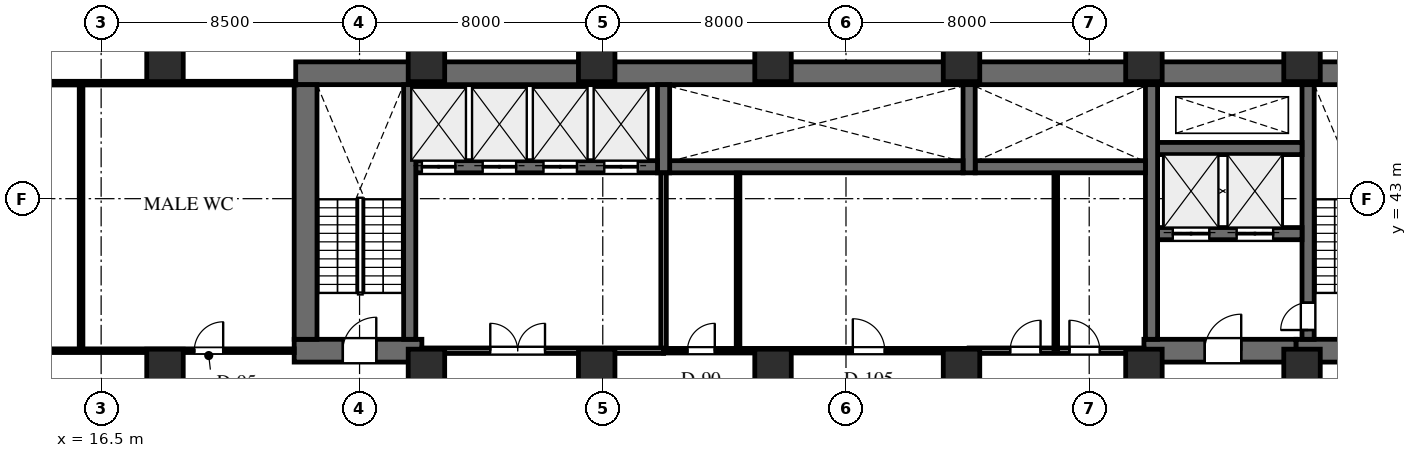
"""IFC4 building model, lengths in metres.
Left out: names, types, materials, properties, quantities, classifications, styles, units other than length and angle.
Written with IfcOpenShell. Run it as: python <this file> out.ifc"""

import sys

from ifc_helpers import new_model, si_unit, direction, frame, frame_2d, origin, origin_2d, place, context, subcontext, project, spatial, rectangle, extrude, element, fill, save


model = new_model("IFC4")
c1 = context("Model", 3, precision=1e-05, world=origin(), true_north=direction((0.0, 1.0)))
c2 = subcontext(c1, "Body", "Model", "MODEL_VIEW")
j1 = project(units=[si_unit("LENGTHUNIT", "METRE"), si_unit("PLANEANGLEUNIT", "RADIAN")], contexts=[c1])
p1 = place(None, origin())
s1 = spatial("IfcSite", under=j1, at=p1, CompositionType="ELEMENT")
p2 = place(p1, origin())
s2 = spatial("IfcBuilding", under=s1, at=p2, CompositionType="ELEMENT")
p3 = place(p2, frame((0.0, 0.0, 69.5)))
s3 = spatial("IfcBuildingStorey", under=s2, at=p3, CompositionType="ELEMENT", Elevation=69.5)
p4 = place(p3, frame((22.9, 47.125, 0.0), z_axis=(0.0, 0.0, 1.0), x_axis=(1.0, 0.0, 0.0)))
e1 = element("IfcWall", 1, at=p4, inside=s3, PredefinedType="SHEAR", context=c2, shape_type="SweptSolid", body=[
    extrude(rectangle(XDim=43.7, YDim=0.75, at=frame_2d((21.85, 0.0))), origin(), (0.0, 0.0, 1.0), 4.0),
])
p5 = place(p3, frame((55.8, 38.0, 0.0), z_axis=(0.0, 0.0, 1.0), x_axis=(1.0, 0.0, 0.0)))
e2 = element("IfcWall", 2, at=p5, inside=s3, PredefinedType="SHEAR", context=c2, shape_type="SweptSolid", body=[
    extrude(rectangle(XDim=10.8, YDim=0.75, at=frame_2d((5.4, 0.0))), origin(), (0.0, 0.0, 1.0), 4.0),
])
p6 = place(p5, frame((1.5, 0.0, 0.0)))
e3 = element("IfcOpeningElement", 3, at=p6, cuts=e2, PredefinedType="OPENING", context=c2, shape_type="SweptSolid", body=[
    extrude(rectangle(XDim=1.1, YDim=2.2, at=frame_2d((0.55, 1.1))), frame((0.0, 0.385, 0.0), z_axis=(0.0, -1.0, 0.0), x_axis=(1.0, 0.0, 0.0)), (0.0, 0.0, 1.0), 0.77),
])
p7 = place(p5, frame((4.82, 0.0, 0.0)))
e4 = element("IfcOpeningElement", 4, at=p7, cuts=e2, PredefinedType="OPENING", context=c2, shape_type="SweptSolid", body=[
    extrude(rectangle(XDim=1.0, YDim=2.15, at=frame_2d((0.5, 1.075))), frame((0.0, 0.385, 0.0), z_axis=(0.0, -1.0, 0.0), x_axis=(1.0, 0.0, 0.0)), (0.0, 0.0, 1.0), 0.77),
])
p8 = place(p5, frame((8.05, 0.0, 0.0)))
e5 = element("IfcOpeningElement", 5, at=p8, cuts=e2, PredefinedType="OPENING", context=c2, shape_type="SweptSolid", body=[
    extrude(rectangle(XDim=1.1, YDim=2.2, at=frame_2d((0.55, 1.1))), frame((0.0, 0.385, 0.0), z_axis=(0.0, -1.0, 0.0), x_axis=(1.0, 0.0, 0.0)), (0.0, 0.0, 1.0), 0.77),
])
p9 = place(p3, frame((56.2, 38.375, 0.0), z_axis=(0.0, 0.0, 1.0), x_axis=(0.0, 1.0, 0.0)))
e6 = element("IfcWall", 6, at=p9, inside=s3, PredefinedType="SHEAR", context=c2, shape_type="SweptSolid", body=[
    extrude(rectangle(XDim=8.375, YDim=0.4, at=frame_2d((4.188, 0.0))), origin(), (0.0, 0.0, 1.0), 4.0),
])
p10 = place(p9, frame((0.305, 0.0, 0.0)))
e7 = element("IfcOpeningElement", 7, at=p10, cuts=e6, PredefinedType="OPENING", context=c2, shape_type="SweptSolid", body=[
    extrude(rectangle(XDim=0.9, YDim=2.15, at=frame_2d((0.45, 1.075))), frame((0.0, 0.21, 0.0), z_axis=(0.0, -1.0, 0.0), x_axis=(1.0, 0.0, 0.0)), (0.0, 0.0, 1.0), 0.42),
])
p11 = place(p3, frame((50.8, 38.0, 0.0), z_axis=(0.0, 0.0, 1.0), x_axis=(1.0, 0.0, 0.0)))
e8 = element("IfcWall", 8, at=p11, inside=s3, PredefinedType="SHEAR", context=c2, shape_type="SweptSolid", body=[
    extrude(rectangle(XDim=5.0, YDim=0.75, at=frame_2d((2.5, 0.0))), origin(), (0.0, 0.0, 1.0), 4.0),
])
p12 = place(p11, frame((2.0, 0.0, 0.0)))
e9 = element("IfcOpeningElement", 9, at=p12, cuts=e8, PredefinedType="OPENING", context=c2, shape_type="SweptSolid", body=[
    extrude(rectangle(XDim=1.2, YDim=2.2, at=frame_2d((0.6, 1.1))), frame((0.0, 0.385, 0.0), z_axis=(0.0, -1.0, 0.0), x_axis=(1.0, 0.0, 0.0)), (0.0, 0.0, 1.0), 0.77),
])
p13 = place(p3, frame((51.25, 41.85, 0.0), z_axis=(0.0, 0.0, 1.0), x_axis=(1.0, 0.0, 0.0)))
e10 = element("IfcWall", 10, at=p13, inside=s3, PredefinedType="SHEAR", context=c2, shape_type="SweptSolid", body=[
    extrude(rectangle(XDim=4.75, YDim=0.4, at=frame_2d((2.375, 0.0))), origin(), (0.0, 0.0, 1.0), 4.0),
])
p14 = place(p13, frame((0.5, 0.0, 0.0)))
e11 = element("IfcOpeningElement", 11, at=p14, cuts=e10, PredefinedType="OPENING", context=c2, shape_type="SweptSolid", body=[
    extrude(rectangle(XDim=1.2, YDim=2.2, at=frame_2d((0.6, 1.1))), frame((0.0, 0.21, 0.0), z_axis=(0.0, -1.0, 0.0), x_axis=(1.0, 0.0, 0.0)), (0.0, 0.0, 1.0), 0.42),
])
p15 = place(p13, frame((2.6, 0.0, 0.0)))
e12 = element("IfcOpeningElement", 12, at=p15, cuts=e10, PredefinedType="OPENING", context=c2, shape_type="SweptSolid", body=[
    extrude(rectangle(XDim=1.2, YDim=2.2, at=frame_2d((0.6, 1.1))), frame((0.0, 0.21, 0.0), z_axis=(0.0, -1.0, 0.0), x_axis=(1.0, 0.0, 0.0)), (0.0, 0.0, 1.0), 0.42),
])
p16 = place(p3, frame((51.25, 44.65, 0.0), z_axis=(0.0, 0.0, 1.0), x_axis=(1.0, 0.0, 0.0)))
e13 = element("IfcWall", 13, at=p16, inside=s3, PredefinedType="SHEAR", context=c2, shape_type="SweptSolid", body=[
    extrude(rectangle(XDim=4.75, YDim=0.4, at=frame_2d((2.375, 0.0))), origin(), (0.0, 0.0, 1.0), 4.0),
])
p17 = place(p3, frame((51.05, 38.375, 0.0), z_axis=(0.0, 0.0, 1.0), x_axis=(0.0, 1.0, 0.0)))
e14 = element("IfcWall", 14, at=p17, inside=s3, PredefinedType="SHEAR", context=c2, shape_type="SweptSolid", body=[
    extrude(rectangle(XDim=8.375, YDim=0.4, at=frame_2d((4.188, 0.0))), origin(), (0.0, 0.0, 1.0), 4.0),
])
p18 = place(p3, frame((45.25, 44.05, 0.0), z_axis=(0.0, 0.0, 1.0), x_axis=(1.0, 0.0, 0.0)))
e15 = element("IfcWall", 15, at=p18, inside=s3, PredefinedType="SHEAR", context=c2, shape_type="SweptSolid", body=[
    extrude(rectangle(XDim=5.6, YDim=0.4, at=frame_2d((2.8, 0.0))), origin(), (0.0, 0.0, 1.0), 4.0),
])
p19 = place(p3, frame((45.05, 43.85, 0.0), z_axis=(0.0, 0.0, 1.0), x_axis=(0.0, 1.0, 0.0)))
e16 = element("IfcWall", 16, at=p19, inside=s3, PredefinedType="SHEAR", context=c2, shape_type="SweptSolid", body=[
    extrude(rectangle(XDim=2.9, YDim=0.4, at=frame_2d((1.45, 0.0))), origin(), (0.0, 0.0, 1.0), 4.0),
])
p20 = place(p3, frame((35.2, 44.05, 0.0), z_axis=(0.0, 0.0, 1.0), x_axis=(1.0, 0.0, 0.0)))
e17 = element("IfcWall", 17, at=p20, inside=s3, PredefinedType="SHEAR", context=c2, shape_type="SweptSolid", body=[
    extrude(rectangle(XDim=9.65, YDim=0.4, at=frame_2d((4.825, 0.0))), origin(), (0.0, 0.0, 1.0), 4.0),
])
p21 = place(p3, frame((35.0, 43.85, 0.0), z_axis=(0.0, 0.0, 1.0), x_axis=(0.0, 1.0, 0.0)))
e18 = element("IfcWall", 18, at=p21, inside=s3, PredefinedType="SHEAR", context=c2, shape_type="SweptSolid", body=[
    extrude(rectangle(XDim=2.9, YDim=0.4, at=frame_2d((1.45, 0.0))), origin(), (0.0, 0.0, 1.0), 4.0),
])
p22 = place(p3, frame((26.85, 44.05, 0.0), z_axis=(0.0, 0.0, 1.0), x_axis=(1.0, 0.0, 0.0)))
e19 = element("IfcWall", 19, at=p22, inside=s3, PredefinedType="SHEAR", context=c2, shape_type="SweptSolid", body=[
    extrude(rectangle(XDim=7.95, YDim=0.4, at=frame_2d((3.975, 0.0))), origin(), (0.0, 0.0, 1.0), 4.0),
])
p23 = place(p22, frame((0.2, 0.0, 0.0)))
e20 = element("IfcOpeningElement", 20, at=p23, cuts=e19, PredefinedType="OPENING", context=c2, shape_type="SweptSolid", body=[
    extrude(rectangle(XDim=1.1, YDim=2.2, at=frame_2d((0.55, 1.1))), frame((0.0, 0.21, 0.0), z_axis=(0.0, -1.0, 0.0), x_axis=(1.0, 0.0, 0.0)), (0.0, 0.0, 1.0), 0.42),
])
p24 = place(p22, frame((2.2, 0.0, 0.0)))
e21 = element("IfcOpeningElement", 21, at=p24, cuts=e19, PredefinedType="OPENING", context=c2, shape_type="SweptSolid", body=[
    extrude(rectangle(XDim=1.1, YDim=2.2, at=frame_2d((0.55, 1.1))), frame((0.0, 0.21, 0.0), z_axis=(0.0, -1.0, 0.0), x_axis=(1.0, 0.0, 0.0)), (0.0, 0.0, 1.0), 0.42),
])
p25 = place(p22, frame((4.2, 0.0, 0.0)))
e22 = element("IfcOpeningElement", 22, at=p25, cuts=e19, PredefinedType="OPENING", context=c2, shape_type="SweptSolid", body=[
    extrude(rectangle(XDim=1.1, YDim=2.2, at=frame_2d((0.55, 1.1))), frame((0.0, 0.21, 0.0), z_axis=(0.0, -1.0, 0.0), x_axis=(1.0, 0.0, 0.0)), (0.0, 0.0, 1.0), 0.42),
])
p26 = place(p22, frame((6.2, 0.0, 0.0)))
e23 = element("IfcOpeningElement", 23, at=p26, cuts=e19, PredefinedType="OPENING", context=c2, shape_type="SweptSolid", body=[
    extrude(rectangle(XDim=1.1, YDim=2.2, at=frame_2d((0.55, 1.1))), frame((0.0, 0.21, 0.0), z_axis=(0.0, -1.0, 0.0), x_axis=(1.0, 0.0, 0.0)), (0.0, 0.0, 1.0), 0.42),
])
p27 = place(p3, frame((22.85, 38.0, 0.0), z_axis=(0.0, 0.0, 1.0), x_axis=(1.0, 0.0, 0.0)))
e24 = element("IfcWall", 24, at=p27, inside=s3, PredefinedType="SHEAR", context=c2, shape_type="SweptSolid", body=[
    extrude(rectangle(XDim=4.2, YDim=0.75, at=frame_2d((2.1, 0.0))), origin(), (0.0, 0.0, 1.0), 4.0),
])
p28 = place(p27, frame((1.6, 0.0, 0.0)))
e25 = element("IfcOpeningElement", 25, at=p28, cuts=e24, PredefinedType="OPENING", context=c2, shape_type="SweptSolid", body=[
    extrude(rectangle(XDim=1.1, YDim=2.2, at=frame_2d((0.55, 1.1))), frame((0.0, 0.385, 0.0), z_axis=(0.0, -1.0, 0.0), x_axis=(1.0, 0.0, 0.0)), (0.0, 0.0, 1.0), 0.77),
])
p29 = place(p3, frame((23.225, 38.375, 0.0), z_axis=(0.0, 0.0, 1.0), x_axis=(0.0, 1.0, 0.0)))
e26 = element("IfcWall", 26, at=p29, inside=s3, PredefinedType="SHEAR", context=c2, shape_type="SweptSolid", body=[
    extrude(rectangle(XDim=8.375, YDim=0.75, at=frame_2d((4.188, 0.0))), origin(), (0.0, 0.0, 1.0), 4.0),
])
p30 = place(p3, frame((26.65, 38.375, 0.0), z_axis=(0.0, 0.0, 1.0), x_axis=(0.0, 1.0, 0.0)))
e27 = element("IfcWall", 27, at=p30, inside=s3, PredefinedType="SHEAR", context=c2, shape_type="SweptSolid", body=[
    extrude(rectangle(XDim=8.375, YDim=0.4, at=frame_2d((4.188, 0.0))), origin(), (0.0, 0.0, 1.0), 4.0),
])
for number, where, z_axis, x_axis in (
    (28, (56.0, 47.55, 0.0), (0.0, 0.0, 1.0), (1.0, 0.0, 0.0)),
    (29, (56.0, 37.35, 0.0), (0.0, 0.0, 1.0), (1.0, 0.0, 0.0)),
    (30, (50.8, 47.55, 0.0), (0.0, 0.0, 1.0), (1.0, 0.0, 0.0)),
    (31, (50.8, 37.35, 0.0), (0.0, 0.0, 1.0), (1.0, 0.0, 0.0)),
    (32, (44.8, 37.35, 0.0), (0.0, 0.0, 1.0), (1.0, 0.0, 0.0)),
    (33, (44.8, 47.55, 0.0), (0.0, 0.0, 1.0), (1.0, 0.0, 0.0)),
    (34, (38.6, 37.35, 0.0), (0.0, 0.0, 1.0), (1.0, 0.0, 0.0)),
    (35, (38.6, 47.55, 0.0), (0.0, 0.0, 1.0), (1.0, 0.0, 0.0)),
    (36, (32.8, 37.35, 0.0), (0.0, 0.0, 1.0), (1.0, 0.0, 0.0)),
    (37, (32.8, 47.55, 0.0), (0.0, 0.0, 1.0), (1.0, 0.0, 0.0)),
    (38, (27.2, 37.35, 0.0), (0.0, 0.0, 1.0), (1.0, 0.0, 0.0)),
    (39, (27.2, 47.55, 0.0), (0.0, 0.0, 1.0), (1.0, 0.0, 0.0)),
    (40, (18.6, 37.35, 0.0), (0.0, 0.0, 1.0), (1.0, 0.0, 0.0)),
    (41, (18.6, 47.55, 0.0), (0.0, 0.0, 1.0), (1.0, 0.0, 0.0)),
):
    element("IfcColumn", number, at=place(p3, frame(where, z_axis=z_axis, x_axis=x_axis)), inside=s3, PredefinedType="COLUMN", context=c2, shape_type="SweptSolid", body=[
        extrude(rectangle(XDim=1.2, YDim=1.4, at=origin_2d()), origin(), (0.0, 0.0, 1.0), 4.0),
    ])
p31 = place(p3, frame((45.05, 38.0, 0.0), z_axis=(0.0, 0.0, 1.0), x_axis=(1.0, 0.0, 0.0)))
e42 = element("IfcWall", 42, at=p31, inside=s3, PredefinedType="STANDARD", context=c2, shape_type="SweptSolid", body=[
    extrude(rectangle(XDim=5.75, YDim=0.18, at=frame_2d((2.875, 0.0))), origin(), (0.0, 0.0, 1.0), 2.813),
])
p32 = place(p31, frame((1.35, 0.0, 0.0)))
e43 = element("IfcOpeningElement", 43, at=p32, cuts=e42, PredefinedType="OPENING", context=c2, shape_type="SweptSolid", body=[
    extrude(rectangle(XDim=1.0, YDim=2.15, at=frame_2d((0.5, 1.075))), frame((0.0, 0.1, 0.0), z_axis=(0.0, -1.0, 0.0), x_axis=(1.0, 0.0, 0.0)), (0.0, 0.0, 1.0), 0.2),
])
p33 = place(p31, frame((3.3, 0.0, 0.0)))
e44 = element("IfcOpeningElement", 44, at=p33, cuts=e42, PredefinedType="OPENING", context=c2, shape_type="SweptSolid", body=[
    extrude(rectangle(XDim=1.0, YDim=2.15, at=frame_2d((0.5, 1.075))), frame((0.0, 0.1, 0.0), z_axis=(0.0, -1.0, 0.0), x_axis=(1.0, 0.0, 0.0)), (0.0, 0.0, 1.0), 0.2),
])
p34 = place(p3, frame((47.9, 38.068, 0.0), z_axis=(0.0, 0.0, 1.0), x_axis=(0.0, 1.0, 0.0)))
e45 = element("IfcWall", 45, at=p34, inside=s3, PredefinedType="PARTITIONING", context=c2, shape_type="SweptSolid", body=[
    extrude(rectangle(XDim=5.774, YDim=0.12, at=frame_2d((2.887, 0.0))), origin(), (0.0, 0.0, 1.0), 3.74),
])
p35 = place(p3, frame((35.0, 38.0, 0.0), z_axis=(0.0, 0.0, 1.0), x_axis=(0.0, 1.0, 0.0)))
e46 = element("IfcWall", 46, at=p35, inside=s3, PredefinedType="STANDARD", context=c2, shape_type="SweptSolid", body=[
    extrude(rectangle(XDim=5.85, YDim=0.18, at=frame_2d((2.925, 0.0))), origin(), (0.0, 0.0, 1.0), 3.74),
])
p36 = place(p3, frame((27.05, 38.0, 0.0), z_axis=(0.0, 0.0, 1.0), x_axis=(1.0, 0.0, 0.0)))
e47 = element("IfcWall", 47, at=p36, inside=s3, PredefinedType="STANDARD", context=c2, shape_type="SweptSolid", body=[
    extrude(rectangle(XDim=7.95, YDim=0.18, at=frame_2d((3.975, 0.0))), origin(), (0.0, 0.0, 1.0), 2.813),
])
p37 = place(p36, frame((2.25, 0.0, 0.0)))
e48 = element("IfcOpeningElement", 48, at=p37, cuts=e47, PredefinedType="OPENING", context=c2, shape_type="SweptSolid", body=[
    extrude(rectangle(XDim=1.8, YDim=2.2, at=frame_2d((0.9, 1.1))), frame((0.0, 0.1, 0.0), z_axis=(0.0, -1.0, 0.0), x_axis=(1.0, 0.0, 0.0)), (0.0, 0.0, 1.0), 0.2),
])
p38 = place(p3, frame((35.0, 38.0, 0.0), z_axis=(0.0, 0.0, 1.0), x_axis=(1.0, 0.0, 0.0)))
e49 = element("IfcWall", 49, at=p38, inside=s3, PredefinedType="PARTITIONING", context=c2, shape_type="SweptSolid", body=[
    extrude(rectangle(XDim=10.05, YDim=0.15, at=frame_2d((5.025, 0.0))), origin(), (0.0, 0.0, 1.0), 2.813),
])
p39 = place(p38, frame((0.785, 0.0, 0.0)))
e50 = element("IfcOpeningElement", 50, at=p39, cuts=e49, PredefinedType="OPENING", context=c2, shape_type="SweptSolid", body=[
    extrude(rectangle(XDim=0.9, YDim=2.1, at=frame_2d((0.45, 1.05))), frame((0.0, 0.085, 0.0), z_axis=(0.0, -1.0, 0.0), x_axis=(1.0, 0.0, 0.0)), (0.0, 0.0, 1.0), 0.17),
])
p40 = place(p38, frame((6.225, 0.0, 0.0)))
e51 = element("IfcOpeningElement", 51, at=p40, cuts=e49, PredefinedType="OPENING", context=c2, shape_type="SweptSolid", body=[
    extrude(rectangle(XDim=1.05, YDim=2.2, at=frame_2d((0.525, 1.1))), frame((0.0, 0.085, 0.0), z_axis=(0.0, -1.0, 0.0), x_axis=(1.0, 0.0, 0.0)), (0.0, 0.0, 1.0), 0.17),
])
p41 = place(p3, frame((37.45, 38.068, 0.0), z_axis=(0.0, 0.0, 1.0), x_axis=(0.0, 1.0, 0.0)))
e52 = element("IfcWall", 52, at=p41, inside=s3, PredefinedType="PARTITIONING", context=c2, shape_type="SweptSolid", body=[
    extrude(rectangle(XDim=5.774, YDim=0.12, at=frame_2d((2.887, 0.0))), origin(), (0.0, 0.0, 1.0), 3.74),
])
p42 = place(p3, frame((6.22, 38.0, 0.0), z_axis=(0.0, 0.0, 1.0), x_axis=(1.0, 0.0, 0.0)))
e53 = element("IfcWall", 53, at=p42, inside=s3, PredefinedType="PARTITIONING", context=c2, shape_type="SweptSolid", body=[
    extrude(rectangle(XDim=16.63, YDim=0.12, at=frame_2d((8.315, 0.0))), origin(), (0.0, 0.0, 1.0), 2.813),
])
p43 = place(p42, frame((0.424, 0.0, 0.0)))
e54 = element("IfcOpeningElement", 54, at=p43, cuts=e53, PredefinedType="OPENING", context=c2, shape_type="SweptSolid", body=[
    extrude(rectangle(XDim=0.95, YDim=2.15, at=frame_2d((0.475, 1.075))), frame((0.0, 0.07, 0.0), z_axis=(0.0, -1.0, 0.0), x_axis=(1.0, 0.0, 0.0)), (0.0, 0.0, 1.0), 0.14),
])
p44 = place(p42, frame((5.444, 0.0, 0.0)))
e55 = element("IfcOpeningElement", 55, at=p44, cuts=e53, PredefinedType="OPENING", context=c2, shape_type="SweptSolid", body=[
    extrude(rectangle(XDim=0.95, YDim=2.15, at=frame_2d((0.475, 1.075))), frame((0.0, 0.07, 0.0), z_axis=(0.0, -1.0, 0.0), x_axis=(1.0, 0.0, 0.0)), (0.0, 0.0, 1.0), 0.14),
])
p45 = place(p42, frame((13.344, 0.0, 0.0)))
e56 = element("IfcOpeningElement", 56, at=p45, cuts=e53, PredefinedType="OPENING", context=c2, shape_type="SweptSolid", body=[
    extrude(rectangle(XDim=0.95, YDim=2.15, at=frame_2d((0.475, 1.075))), frame((0.0, 0.07, 0.0), z_axis=(0.0, -1.0, 0.0), x_axis=(1.0, 0.0, 0.0)), (0.0, 0.0, 1.0), 0.14),
])
p46 = place(p3, frame((6.22, 46.8, 0.0), z_axis=(0.0, 0.0, 1.0), x_axis=(1.0, 0.0, 0.0)))
e57 = element("IfcWall", 57, at=p46, inside=s3, PredefinedType="PARTITIONING", context=c2, shape_type="SweptSolid", body=[
    extrude(rectangle(XDim=16.68, YDim=0.12, at=frame_2d((8.34, 0.0))), origin(), (0.0, 0.0, 1.0), 2.813),
])
p47 = place(p3, frame((15.84, 38.068, 0.0), z_axis=(0.0, 0.0, 1.0), x_axis=(0.0, 1.0, 0.0)))
e58 = element("IfcWall", 58, at=p47, inside=s3, PredefinedType="PARTITIONING", context=c2, shape_type="SweptSolid", body=[
    extrude(rectangle(XDim=8.664, YDim=0.12, at=frame_2d((4.332, 0.0))), origin(), (0.0, 0.0, 1.0), 3.74),
])
p48 = place(p12, origin())
e59 = element("IfcDoor", 59, at=p48, inside=s3, OperationType="SINGLE_SWING_RIGHT", PredefinedType="DOOR", context=c2, shape_type="SweptSolid", body=[
    extrude(rectangle(XDim=1.2, YDim=2.2, at=frame_2d((0.6, 1.1))), frame((0.0, 0.025, 0.0), z_axis=(0.0, -1.0, 0.0), x_axis=(1.0, 0.0, 0.0)), (0.0, 0.0, 1.0), 0.05),
])
fill(e9, e59)
p49 = place(p10, origin())
e60 = element("IfcDoor", 60, at=p49, inside=s3, OperationType="SINGLE_SWING_LEFT", PredefinedType="DOOR", context=c2, shape_type="SweptSolid", body=[
    extrude(rectangle(XDim=0.9, YDim=2.15, at=frame_2d((0.45, 1.075))), frame((0.0, 0.025, 0.0), z_axis=(0.0, -1.0, 0.0), x_axis=(1.0, 0.0, 0.0)), (0.0, 0.0, 1.0), 0.05),
])
fill(e7, e60)
p50 = place(p28, origin())
e61 = element("IfcDoor", 61, at=p50, inside=s3, OperationType="SINGLE_SWING_RIGHT", PredefinedType="DOOR", context=c2, shape_type="SweptSolid", body=[
    extrude(rectangle(XDim=1.1, YDim=2.2, at=frame_2d((0.55, 1.1))), frame((0.0, 0.025, 0.0), z_axis=(0.0, -1.0, 0.0), x_axis=(1.0, 0.0, 0.0)), (0.0, 0.0, 1.0), 0.05),
])
fill(e25, e61)
p51 = place(p23, origin())
e62 = element("IfcDoor", 62, at=p51, inside=s3, OperationType="DOUBLE_DOOR_SLIDING", PredefinedType="DOOR", context=c2, shape_type="SweptSolid", body=[
    extrude(rectangle(XDim=1.1, YDim=2.2, at=frame_2d((0.55, 1.1))), frame((0.0, 0.025, 0.0), z_axis=(0.0, -1.0, 0.0), x_axis=(1.0, 0.0, 0.0)), (0.0, 0.0, 1.0), 0.05),
])
fill(e20, e62)
p52 = place(p24, origin())
e63 = element("IfcDoor", 63, at=p52, inside=s3, OperationType="DOUBLE_DOOR_SLIDING", PredefinedType="DOOR", context=c2, shape_type="SweptSolid", body=[
    extrude(rectangle(XDim=1.1, YDim=2.2, at=frame_2d((0.55, 1.1))), frame((0.0, 0.025, 0.0), z_axis=(0.0, -1.0, 0.0), x_axis=(1.0, 0.0, 0.0)), (0.0, 0.0, 1.0), 0.05),
])
fill(e21, e63)
p53 = place(p25, origin())
e64 = element("IfcDoor", 64, at=p53, inside=s3, OperationType="DOUBLE_DOOR_SLIDING", PredefinedType="DOOR", context=c2, shape_type="SweptSolid", body=[
    extrude(rectangle(XDim=1.1, YDim=2.2, at=frame_2d((0.55, 1.1))), frame((0.0, 0.025, 0.0), z_axis=(0.0, -1.0, 0.0), x_axis=(1.0, 0.0, 0.0)), (0.0, 0.0, 1.0), 0.05),
])
fill(e22, e64)
p54 = place(p26, origin())
e65 = element("IfcDoor", 65, at=p54, inside=s3, OperationType="DOUBLE_DOOR_SLIDING", PredefinedType="DOOR", context=c2, shape_type="SweptSolid", body=[
    extrude(rectangle(XDim=1.1, YDim=2.2, at=frame_2d((0.55, 1.1))), frame((0.0, 0.025, 0.0), z_axis=(0.0, -1.0, 0.0), x_axis=(1.0, 0.0, 0.0)), (0.0, 0.0, 1.0), 0.05),
])
fill(e23, e65)
p55 = place(p14, origin())
e66 = element("IfcDoor", 66, at=p55, inside=s3, OperationType="DOUBLE_DOOR_SLIDING", PredefinedType="DOOR", context=c2, shape_type="SweptSolid", body=[
    extrude(rectangle(XDim=1.2, YDim=2.2, at=frame_2d((0.6, 1.1))), frame((0.0, 0.025, 0.0), z_axis=(0.0, -1.0, 0.0), x_axis=(1.0, 0.0, 0.0)), (0.0, 0.0, 1.0), 0.05),
])
fill(e11, e66)
p56 = place(p15, origin())
e67 = element("IfcDoor", 67, at=p56, inside=s3, OperationType="DOUBLE_DOOR_SLIDING", PredefinedType="DOOR", context=c2, shape_type="SweptSolid", body=[
    extrude(rectangle(XDim=1.2, YDim=2.2, at=frame_2d((0.6, 1.1))), frame((0.0, 0.025, 0.0), z_axis=(0.0, -1.0, 0.0), x_axis=(1.0, 0.0, 0.0)), (0.0, 0.0, 1.0), 0.05),
])
fill(e12, e67)
p57 = place(p32, origin())
e68 = element("IfcDoor", 68, at=p57, inside=s3, OperationType="SINGLE_SWING_RIGHT", PredefinedType="DOOR", context=c2, shape_type="SweptSolid", body=[
    extrude(rectangle(XDim=1.0, YDim=2.15, at=frame_2d((0.5, 1.075))), frame((0.0, 0.025, 0.0), z_axis=(0.0, -1.0, 0.0), x_axis=(1.0, 0.0, 0.0)), (0.0, 0.0, 1.0), 0.05),
])
fill(e43, e68)
p58 = place(p33, origin())
e69 = element("IfcDoor", 69, at=p58, inside=s3, OperationType="SINGLE_SWING_LEFT", PredefinedType="DOOR", context=c2, shape_type="SweptSolid", body=[
    extrude(rectangle(XDim=1.0, YDim=2.15, at=frame_2d((0.5, 1.075))), frame((0.0, 0.025, 0.0), z_axis=(0.0, -1.0, 0.0), x_axis=(1.0, 0.0, 0.0)), (0.0, 0.0, 1.0), 0.05),
])
fill(e44, e69)
p59 = place(p37, origin())
e70 = element("IfcDoor", 70, at=p59, inside=s3, OperationType="DOUBLE_DOOR_SINGLE_SWING", PredefinedType="DOOR", context=c2, shape_type="SweptSolid", body=[
    extrude(rectangle(XDim=1.8, YDim=2.2, at=frame_2d((0.9, 1.1))), frame((0.0, 0.025, 0.0), z_axis=(0.0, -1.0, 0.0), x_axis=(1.0, 0.0, 0.0)), (0.0, 0.0, 1.0), 0.05),
])
fill(e48, e70)
p60 = place(p39, origin())
e71 = element("IfcDoor", 71, at=p60, inside=s3, OperationType="SINGLE_SWING_RIGHT", PredefinedType="DOOR", context=c2, shape_type="SweptSolid", body=[
    extrude(rectangle(XDim=0.9, YDim=2.1, at=frame_2d((0.45, 1.05))), frame((0.0, 0.025, 0.0), z_axis=(0.0, -1.0, 0.0), x_axis=(1.0, 0.0, 0.0)), (0.0, 0.0, 1.0), 0.05),
])
fill(e50, e71)
p61 = place(p40, origin())
e72 = element("IfcDoor", 72, at=p61, inside=s3, OperationType="SINGLE_SWING_LEFT", PredefinedType="DOOR", context=c2, shape_type="SweptSolid", body=[
    extrude(rectangle(XDim=1.05, YDim=2.2, at=frame_2d((0.525, 1.1))), frame((0.0, 0.025, 0.0), z_axis=(0.0, -1.0, 0.0), x_axis=(1.0, 0.0, 0.0)), (0.0, 0.0, 1.0), 0.05),
])
fill(e51, e72)
p62 = place(p45, origin())
e73 = element("IfcDoor", 73, at=p62, inside=s3, OperationType="SINGLE_SWING_RIGHT", PredefinedType="DOOR", context=c2, shape_type="SweptSolid", body=[
    extrude(rectangle(XDim=0.95, YDim=2.15, at=frame_2d((0.475, 1.075))), frame((0.0, 0.025, 0.0), z_axis=(0.0, -1.0, 0.0), x_axis=(1.0, 0.0, 0.0)), (0.0, 0.0, 1.0), 0.05),
])
fill(e56, e73)
save(model, sys.argv[1])
